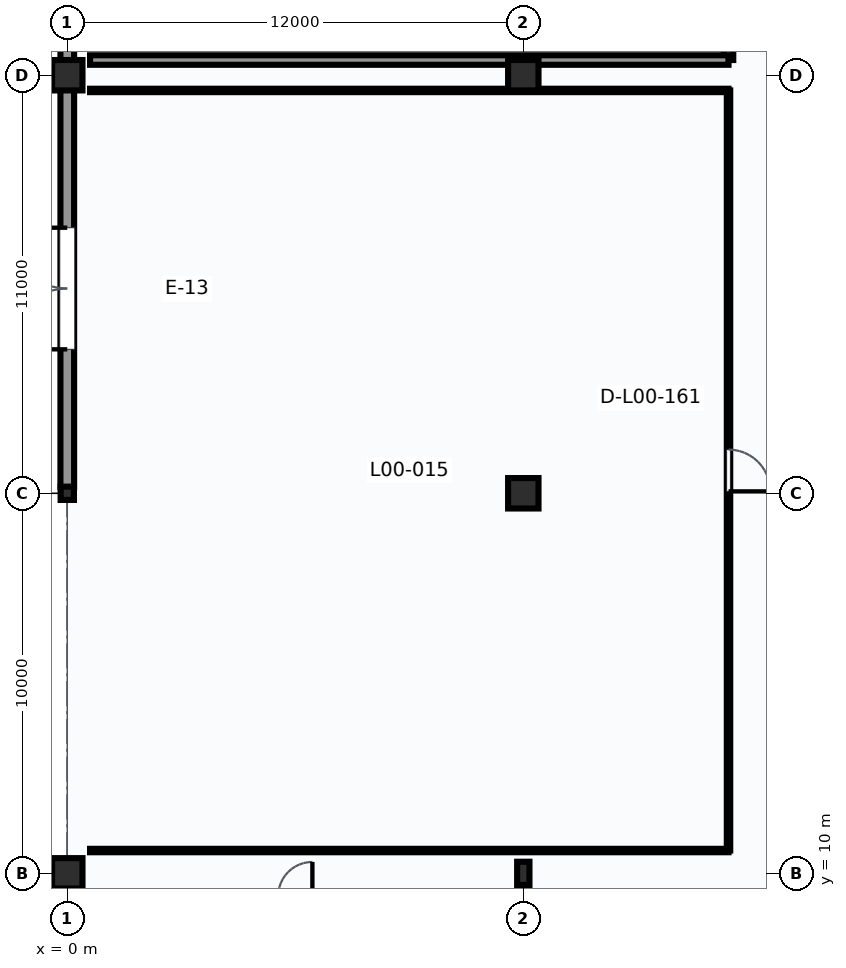
"""IFC4 building model, lengths in metres.
Left out: names, types, materials, properties, quantities, classifications, styles, units other than length and angle.
Written with IfcOpenShell. Run it as: python <this file> out.ifc"""

import sys

from ifc_helpers import new_model, si_unit, direction, frame, frame_2d, origin, origin_2d, place, context, subcontext, project, spatial, rectangle, hollow_rectangle, i_section, extrude, element, fill, save


model = new_model("IFC4")
c1 = context("Model", 3, precision=1e-05, world=origin(), true_north=direction((0.0, 1.0)))
c2 = subcontext(c1, "Body", "Model", "MODEL_VIEW")
j1 = project(units=[si_unit("LENGTHUNIT", "METRE"), si_unit("PLANEANGLEUNIT", "RADIAN")], contexts=[c1])
p1 = place(None, origin())
s1 = spatial("IfcSite", under=j1, at=p1, CompositionType="ELEMENT")
p2 = place(p1, origin())
s2 = spatial("IfcBuilding", under=s1, at=p2, CompositionType="ELEMENT")
p3 = place(p2, origin())
s3 = spatial("IfcBuildingStorey", under=s2, at=p3, CompositionType="ELEMENT", Elevation=0.0)
p4 = place(p3, frame((0.0, 10.0, 0.0), z_axis=(0.0, 0.0, 1.0), x_axis=(1.0, 0.0, 0.0)))
e1 = element("IfcColumn", 1, at=p4, inside=s3, PredefinedType="COLUMN", context=c2, shape_type="SweptSolid", body=[
    extrude(rectangle(XDim=0.8, YDim=0.8, at=origin_2d()), origin(), (0.0, 0.0, 1.0), 5.4),
])
p5 = place(p3, frame((0.0, 20.0, 0.0), z_axis=(0.0, 0.0, 1.0), x_axis=(1.0, 0.0, 0.0)))
e2 = element("IfcColumn", 2, at=p5, inside=s3, PredefinedType="COLUMN", context=c2, shape_type="SweptSolid", body=[
    extrude(hollow_rectangle(XDim=0.35, YDim=0.35, WallThickness=0.016, InnerFilletRadius=0.016, OuterFilletRadius=0.032, at=origin_2d()), origin(), (0.0, 0.0, 1.0), 5.4),
])
p6 = place(p3, frame((0.0, 31.0, 0.0), z_axis=(0.0, 0.0, 1.0), x_axis=(1.0, 0.0, 0.0)))
e3 = element("IfcColumn", 3, at=p6, inside=s3, PredefinedType="COLUMN", context=c2, shape_type="SweptSolid", body=[
    extrude(rectangle(XDim=0.8, YDim=0.8, at=origin_2d()), origin(), (0.0, 0.0, 1.0), 5.4),
])
p7 = place(p3, frame((12.0, 10.0, 0.0), z_axis=(0.0, 0.0, 1.0), x_axis=(1.0, 0.0, 0.0)))
e4 = element("IfcColumn", 4, at=p7, inside=s3, PredefinedType="COLUMN", context=c2, shape_type="SweptSolid", body=[
    extrude(i_section(OverallWidth=0.324, OverallDepth=0.611, WebThickness=0.013, FlangeThickness=0.019, FilletRadius=0.016, at=origin_2d()), origin(), (0.0, 0.0, 1.0), 5.4),
])
for number, where, z_axis, x_axis in (
    (5, (12.0, 20.0, 0.0), (0.0, 0.0, 1.0), (1.0, 0.0, 0.0)),
    (6, (12.0, 31.0, 0.0), (0.0, 0.0, 1.0), (1.0, 0.0, 0.0)),
):
    element("IfcColumn", number, at=place(p3, frame(where, z_axis=z_axis, x_axis=x_axis)), inside=s3, PredefinedType="COLUMN", context=c2, shape_type="SweptSolid", body=[
        extrude(rectangle(XDim=0.8, YDim=0.8, at=origin_2d()), origin(), (0.0, 0.0, 1.0), 5.4),
    ])
p8 = place(p3, frame((0.0, 0.385, 0.0), z_axis=(0.0, 0.0, 1.0), x_axis=(0.0, 1.0, 0.0)))
e7 = element("IfcWall", 7, at=p8, inside=s3, PredefinedType="SOLIDWALL", context=c2, shape_type="SweptSolid", body=[
    extrude(rectangle(XDim=9.23, YDim=0.24, at=frame_2d((4.615, 0.0))), origin(), (0.0, 0.0, 1.0), 4.347),
])
p9 = place(p8, frame((1.834, 0.0, 0.9)))
e8 = element("IfcOpeningElement", 8, at=p9, cuts=e7, PredefinedType="OPENING", context=c2, shape_type="SweptSolid", body=[
    extrude(rectangle(XDim=1.5, YDim=1.5, at=frame_2d((0.75, 0.75))), frame((0.0, 0.13, 0.0), z_axis=(0.0, -1.0, 0.0), x_axis=(1.0, 0.0, 0.0)), (0.0, 0.0, 1.0), 0.26),
])
p10 = place(p8, frame((5.896, 0.0, 0.9)))
e9 = element("IfcOpeningElement", 9, at=p10, cuts=e7, PredefinedType="OPENING", context=c2, shape_type="SweptSolid", body=[
    extrude(rectangle(XDim=1.5, YDim=1.8, at=frame_2d((0.75, 0.9))), frame((0.0, 0.13, 0.0), z_axis=(0.0, -1.0, 0.0), x_axis=(1.0, 0.0, 0.0)), (0.0, 0.0, 1.0), 0.26),
])
p11 = place(p3, frame((0.0, 20.16, 0.0), z_axis=(0.0, 0.0, 1.0), x_axis=(0.0, 1.0, 0.0)))
e10 = element("IfcWall", 10, at=p11, inside=s3, PredefinedType="SOLIDWALL", context=c2, shape_type="SweptSolid", body=[
    extrude(rectangle(XDim=10.455, YDim=0.36, at=frame_2d((5.228, 0.0))), origin(), (0.0, 0.0, 1.0), 4.27),
])
p12 = place(p11, frame((3.628, 0.0, 0.0)))
e11 = element("IfcOpeningElement", 11, at=p12, cuts=e10, PredefinedType="OPENING", context=c2, shape_type="SweptSolid", body=[
    extrude(rectangle(XDim=3.2, YDim=2.4, at=frame_2d((1.6, 1.2))), frame((0.0, 0.19, 0.0), z_axis=(0.0, -1.0, 0.0), x_axis=(1.0, 0.0, 0.0)), (0.0, 0.0, 1.0), 0.38),
])
p13 = place(p3, frame((0.0, 31.385, 0.0), z_axis=(0.0, 0.0, 1.0), x_axis=(0.0, 1.0, 0.0)))
e12 = element("IfcWall", 12, at=p13, inside=s3, PredefinedType="SOLIDWALL", context=c2, shape_type="SweptSolid", body=[
    extrude(rectangle(XDim=10.23, YDim=0.36, at=frame_2d((5.115, 0.0))), origin(), (0.0, 0.0, 1.0), 4.347),
])
p14 = place(p13, frame((3.515, 0.0, 0.0)))
e13 = element("IfcOpeningElement", 13, at=p14, cuts=e12, PredefinedType="OPENING", context=c2, shape_type="SweptSolid", body=[
    extrude(rectangle(XDim=3.2, YDim=2.6, at=frame_2d((1.6, 1.3))), frame((0.0, 0.19, 0.0), z_axis=(0.0, -1.0, 0.0), x_axis=(1.0, 0.0, 0.0)), (0.0, 0.0, 1.0), 0.38),
])
p15 = place(p3, frame((17.4, 30.6, 0.0), z_axis=(0.0, 0.0, 1.0), x_axis=(0.0, -1.0, 0.0)))
e14 = element("IfcWall", 14, at=p15, inside=s3, PredefinedType="PARTITIONING", context=c2, shape_type="SweptSolid", body=[
    extrude(rectangle(XDim=20.0, YDim=0.09, at=frame_2d((10.0, 0.0))), origin(), (0.0, 0.0, 1.0), 5.06),
])
p16 = place(p15, frame((9.45, 0.0, 0.0)))
e15 = element("IfcOpeningElement", 15, at=p16, cuts=e14, PredefinedType="OPENING", context=c2, shape_type="SweptSolid", body=[
    extrude(rectangle(XDim=1.1, YDim=2.2, at=frame_2d((0.55, 1.1))), frame((0.0, 0.055, 0.0), z_axis=(0.0, -1.0, 0.0), x_axis=(1.0, 0.0, 0.0)), (0.0, 0.0, 1.0), 0.11),
])
p17 = place(p3, frame((17.4, 10.6, 0.0), z_axis=(0.0, 0.0, 1.0), x_axis=(-1.0, 0.0, 0.0)))
e16 = element("IfcWall", 16, at=p17, inside=s3, PredefinedType="PARTITIONING", context=c2, shape_type="SweptSolid", body=[
    extrude(rectangle(XDim=16.8, YDim=0.09, at=frame_2d((8.4, 0.0))), origin(), (0.0, 0.0, 1.0), 4.429),
])
p18 = place(p3, frame((0.6, 30.6, 0.0), z_axis=(0.0, 0.0, 1.0), x_axis=(1.0, 0.0, 0.0)))
e17 = element("IfcWall", 17, at=p18, inside=s3, PredefinedType="PARTITIONING", context=c2, shape_type="SweptSolid", body=[
    extrude(rectangle(XDim=16.8, YDim=0.09, at=frame_2d((8.4, 0.0))), origin(), (0.0, 0.0, 1.0), 4.424),
])
p19 = place(p3, frame((17.4, 51.4, 0.0), z_axis=(0.0, 0.0, 1.0), x_axis=(0.0, -1.0, 0.0)))
e18 = element("IfcWall", 18, at=p19, inside=s3, PredefinedType="SOLIDWALL", context=c2, shape_type="SweptSolid", body=[
    extrude(rectangle(XDim=20.0, YDim=0.25, at=frame_2d((10.0, 0.0))), origin(), (0.0, 0.0, 1.0), 4.424),
])
p20 = place(p19, frame((9.525, 0.0, 0.0)))
e19 = element("IfcOpeningElement", 19, at=p20, cuts=e18, PredefinedType="OPENING", context=c2, shape_type="SweptSolid", body=[
    extrude(rectangle(XDim=0.95, YDim=2.15, at=frame_2d((0.475, 1.075))), frame((0.0, 0.135, 0.0), z_axis=(0.0, -1.0, 0.0), x_axis=(1.0, 0.0, 0.0)), (0.0, 0.0, 1.0), 0.27),
])
p21 = place(p3, frame((17.4, 31.4, 0.0), z_axis=(0.0, 0.0, 1.0), x_axis=(-1.0, 0.0, 0.0)))
e20 = element("IfcWall", 20, at=p21, inside=s3, PredefinedType="SOLIDWALL", context=c2, shape_type="SweptSolid", body=[
    extrude(rectangle(XDim=16.8, YDim=0.25, at=frame_2d((8.4, 0.0))), origin(), (0.0, 0.0, 1.0), 4.04),
])
p22 = place(p12, origin())
e21 = element("IfcDoor", 21, at=p22, inside=s3, OperationType="DOUBLE_DOOR_SINGLE_SWING", PredefinedType="DOOR", context=c2, shape_type="SweptSolid", body=[
    extrude(rectangle(XDim=3.2, YDim=2.4, at=frame_2d((1.6, 1.2))), frame((0.0, 0.025, 0.0), z_axis=(0.0, -1.0, 0.0), x_axis=(1.0, 0.0, 0.0)), (0.0, 0.0, 1.0), 0.05),
])
fill(e11, e21)
p23 = place(p16, origin())
e22 = element("IfcDoor", 22, at=p23, inside=s3, OperationType="SINGLE_SWING_RIGHT", PredefinedType="DOOR", context=c2, shape_type="SweptSolid", body=[
    extrude(rectangle(XDim=1.1, YDim=2.2, at=frame_2d((0.55, 1.1))), frame((0.0, 0.025, 0.0), z_axis=(0.0, -1.0, 0.0), x_axis=(1.0, 0.0, 0.0)), (0.0, 0.0, 1.0), 0.05),
])
fill(e15, e22)
save(model, sys.argv[1])
